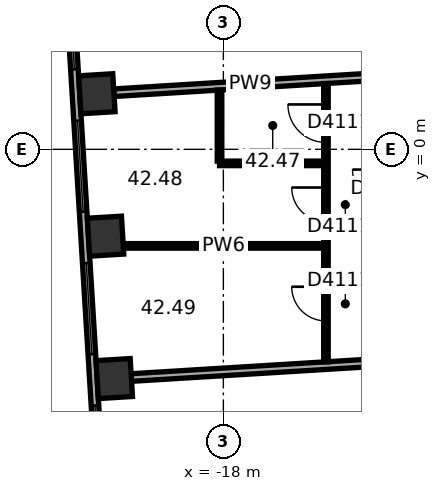
"""IFC4 building model, lengths in metres.
Left out: names, types, materials, properties, quantities, classifications, styles, units other than length and angle.
Written with IfcOpenShell. Run it as: python <this file> out.ifc"""

import sys

from ifc_helpers import new_model, si_unit, direction, frame, frame_2d, origin, origin_2d, place, context, subcontext, project, spatial, rectangle, extrude, element, fill, save


model = new_model("IFC4")
c1 = context("Model", 3, precision=1e-05, world=origin(), true_north=direction((0.0, 1.0)))
c2 = subcontext(c1, "Body", "Model", "MODEL_VIEW")
j1 = project(units=[si_unit("LENGTHUNIT", "METRE"), si_unit("PLANEANGLEUNIT", "RADIAN")], contexts=[c1])
p1 = place(None, origin())
s1 = spatial("IfcSite", under=j1, at=p1, CompositionType="ELEMENT")
p2 = place(p1, origin())
s2 = spatial("IfcBuilding", under=s1, at=p2, CompositionType="ELEMENT")
p3 = place(p2, frame((0.0, 0.0, 172.5)))
s3 = spatial("IfcBuildingStorey", under=s2, at=p3, CompositionType="ELEMENT", Elevation=172.5)
for number, where, z_axis, x_axis in (
    (1, (-21.329, 1.462, 0.0), (0.0, 0.0, 1.0), (0.061, -0.998, 0.0)),
    (2, (-21.1, -2.285, 0.0), (0.0, 0.0, 1.0), (0.061, -0.998, 0.0)),
    (3, (-20.871, -6.032, 0.0), (0.0, 0.0, 1.0), (0.061, -0.998, 0.0)),
):
    element("IfcColumn", number, at=place(p3, frame(where, z_axis=z_axis, x_axis=x_axis)), inside=s3, PredefinedType="COLUMN", context=c2, shape_type="SweptSolid", body=[
        extrude(rectangle(XDim=1.0, YDim=0.9, at=origin_2d()), origin(), (0.0, 0.0, 1.0), 3.7),
    ])
p4 = place(p3, frame((-22.375, 9.557, 0.0), z_axis=(0.0, 0.0, 1.0), x_axis=(0.061036015339, -0.998135564356, 0.0)))
e4 = element("IfcWall", 4, at=p4, inside=s3, PredefinedType="STANDARD", context=c2, shape_type="SweptSolid", body=[
    extrude(rectangle(XDim=20.044, YDim=0.2, at=frame_2d((10.022, 0.0))), origin(), (0.0, 0.0, 1.0), 3.7),
])
p5 = place(p4, frame((1.313, 0.0, 0.9)))
e5 = element("IfcOpeningElement", 5, at=p5, cuts=e4, PredefinedType="OPENING", context=c2, shape_type="SweptSolid", body=[
    extrude(rectangle(XDim=2.4, YDim=2.0, at=frame_2d((1.2, 1.0))), frame((0.0, 0.11, 0.0), z_axis=(0.0, -1.0, 0.0), x_axis=(1.0, 0.0, 0.0)), (0.0, 0.0, 1.0), 0.22),
])
p6 = place(p4, frame((5.067, 0.0, 0.9)))
e6 = element("IfcOpeningElement", 6, at=p6, cuts=e4, PredefinedType="OPENING", context=c2, shape_type="SweptSolid", body=[
    extrude(rectangle(XDim=2.4, YDim=2.0, at=frame_2d((1.2, 1.0))), frame((0.0, 0.11, 0.0), z_axis=(0.0, -1.0, 0.0), x_axis=(1.0, 0.0, 0.0)), (0.0, 0.0, 1.0), 0.22),
])
p7 = place(p4, frame((8.821, 0.0, 0.9)))
e7 = element("IfcOpeningElement", 7, at=p7, cuts=e4, PredefinedType="OPENING", context=c2, shape_type="SweptSolid", body=[
    extrude(rectangle(XDim=2.4, YDim=2.0, at=frame_2d((1.2, 1.0))), frame((0.0, 0.11, 0.0), z_axis=(0.0, -1.0, 0.0), x_axis=(1.0, 0.0, 0.0)), (0.0, 0.0, 1.0), 0.22),
])
p8 = place(p4, frame((12.575, 0.0, 0.9)))
e8 = element("IfcOpeningElement", 8, at=p8, cuts=e4, PredefinedType="OPENING", context=c2, shape_type="SweptSolid", body=[
    extrude(rectangle(XDim=2.4, YDim=2.0, at=frame_2d((1.2, 1.0))), frame((0.0, 0.11, 0.0), z_axis=(0.0, -1.0, 0.0), x_axis=(1.0, 0.0, 0.0)), (0.0, 0.0, 1.0), 0.22),
])
p9 = place(p4, frame((16.329, 0.0, 0.9)))
e9 = element("IfcOpeningElement", 9, at=p9, cuts=e4, PredefinedType="OPENING", context=c2, shape_type="SweptSolid", body=[
    extrude(rectangle(XDim=2.4, YDim=2.0, at=frame_2d((1.2, 1.0))), frame((0.0, 0.11, 0.0), z_axis=(0.0, -1.0, 0.0), x_axis=(1.0, 0.0, 0.0)), (0.0, 0.0, 1.0), 0.22),
])
p10 = place(p3, frame((-20.88, 1.49, 0.0), z_axis=(0.0, 0.0, 1.0), x_axis=(0.998134881975, 0.061047173439, 0.0)))
e10 = element("IfcWall", 10, at=p10, inside=s3, PredefinedType="PARTITIONING", context=c2, shape_type="SweptSolid", body=[
    extrude(rectangle(XDim=7.183, YDim=0.2, at=frame_2d((3.591, 0.0))), origin(), (0.0, 0.0, 1.0), 2.87),
])
p11 = place(p3, frame((-20.633, -2.541, 0.0), z_axis=(0.0, 0.0, 1.0), x_axis=(1.0, 0.0, 0.0)))
e11 = element("IfcWall", 11, at=p11, inside=s3, PredefinedType="PARTITIONING", context=c2, shape_type="SweptSolid", body=[
    extrude(rectangle(XDim=5.272, YDim=0.12, at=frame_2d((2.636, 0.0))), origin(), (0.0, 0.0, 1.0), 3.42),
])
p12 = place(p3, frame((-20.421, -6.005, 0.0), z_axis=(0.0, 0.0, 1.0), x_axis=(0.998134865741, 0.061047438866, 0.0)))
e12 = element("IfcWall", 12, at=p12, inside=s3, PredefinedType="PARTITIONING", context=c2, shape_type="SweptSolid", body=[
    extrude(rectangle(XDim=7.927, YDim=0.2, at=frame_2d((3.963, 0.0))), origin(), (0.0, 0.0, 1.0), 2.87),
])
p13 = place(p3, frame((-18.101, -0.369, 0.0), z_axis=(0.0, 0.0, 1.0), x_axis=(1.0, 0.0, 0.0)))
e13 = element("IfcWall", 13, at=p13, inside=s3, PredefinedType="PARTITIONING", context=c2, shape_type="SweptSolid", body=[
    extrude(rectangle(XDim=2.74, YDim=0.12, at=frame_2d((1.37, 0.0))), origin(), (0.0, 0.0, 1.0), 3.42),
])
p14 = place(p3, frame((-18.101, 1.559, 0.0), z_axis=(0.0, 0.0, 1.0), x_axis=(0.0, -1.0, 0.0)))
e14 = element("IfcWall", 14, at=p14, inside=s3, PredefinedType="PARTITIONING", context=c2, shape_type="SweptSolid", body=[
    extrude(rectangle(XDim=1.869, YDim=0.12, at=frame_2d((0.934, 0.0))), origin(), (0.0, 0.0, 1.0), 3.42),
])
p15 = place(p3, frame((-15.301, 1.731, 0.0), z_axis=(0.0, 0.0, 1.0), x_axis=(0.0, -1.0, 0.0)))
e15 = element("IfcWall", 15, at=p15, inside=s3, PredefinedType="PARTITIONING", context=c2, shape_type="SweptSolid", body=[
    extrude(rectangle(XDim=7.322, YDim=0.12, at=frame_2d((3.661, 0.0))), origin(), (0.0, 0.0, 1.0), 3.42),
])
p16 = place(p15, frame((0.55, 0.0, 0.0)))
e16 = element("IfcOpeningElement", 16, at=p16, cuts=e15, PredefinedType="OPENING", context=c2, shape_type="SweptSolid", body=[
    extrude(rectangle(XDim=1.0, YDim=2.1, at=frame_2d((0.5, 1.05))), frame((0.0, 0.07, 0.0), z_axis=(0.0, -1.0, 0.0), x_axis=(1.0, 0.0, 0.0)), (0.0, 0.0, 1.0), 0.14),
])
p17 = place(p15, frame((2.736, 0.0, 0.0)))
e17 = element("IfcOpeningElement", 17, at=p17, cuts=e15, PredefinedType="OPENING", context=c2, shape_type="SweptSolid", body=[
    extrude(rectangle(XDim=0.9, YDim=2.1, at=frame_2d((0.45, 1.05))), frame((0.0, 0.07, 0.0), z_axis=(0.0, -1.0, 0.0), x_axis=(1.0, 0.0, 0.0)), (0.0, 0.0, 1.0), 0.14),
])
p18 = place(p15, frame((5.347, 0.0, 0.0)))
e18 = element("IfcOpeningElement", 18, at=p18, cuts=e15, PredefinedType="OPENING", context=c2, shape_type="SweptSolid", body=[
    extrude(rectangle(XDim=0.9, YDim=2.1, at=frame_2d((0.45, 1.05))), frame((0.0, 0.07, 0.0), z_axis=(0.0, -1.0, 0.0), x_axis=(1.0, 0.0, 0.0)), (0.0, 0.0, 1.0), 0.14),
])
p19 = place(p6, origin())
e19 = element("IfcWindow", 19, at=p19, inside=s3, PartitioningType="SINGLE_PANEL", PredefinedType="WINDOW", context=c2, shape_type="SweptSolid", body=[
    extrude(rectangle(XDim=2.4, YDim=2.0, at=frame_2d((1.2, 1.0))), frame((0.0, 0.03, 0.0), z_axis=(0.0, -1.0, 0.0), x_axis=(1.0, 0.0, 0.0)), (0.0, 0.0, 1.0), 0.06),
])
fill(e6, e19)
p20 = place(p7, origin())
e20 = element("IfcWindow", 20, at=p20, inside=s3, PartitioningType="SINGLE_PANEL", PredefinedType="WINDOW", context=c2, shape_type="SweptSolid", body=[
    extrude(rectangle(XDim=2.4, YDim=2.0, at=frame_2d((1.2, 1.0))), frame((0.0, 0.03, 0.0), z_axis=(0.0, -1.0, 0.0), x_axis=(1.0, 0.0, 0.0)), (0.0, 0.0, 1.0), 0.06),
])
fill(e7, e20)
p21 = place(p8, origin())
e21 = element("IfcWindow", 21, at=p21, inside=s3, PartitioningType="SINGLE_PANEL", PredefinedType="WINDOW", context=c2, shape_type="SweptSolid", body=[
    extrude(rectangle(XDim=2.4, YDim=2.0, at=frame_2d((1.2, 1.0))), frame((0.0, 0.03, 0.0), z_axis=(0.0, -1.0, 0.0), x_axis=(1.0, 0.0, 0.0)), (0.0, 0.0, 1.0), 0.06),
])
fill(e8, e21)
p22 = place(p9, origin())
e22 = element("IfcWindow", 22, at=p22, inside=s3, PartitioningType="SINGLE_PANEL", PredefinedType="WINDOW", context=c2, shape_type="SweptSolid", body=[
    extrude(rectangle(XDim=2.4, YDim=2.0, at=frame_2d((1.2, 1.0))), frame((0.0, 0.03, 0.0), z_axis=(0.0, -1.0, 0.0), x_axis=(1.0, 0.0, 0.0)), (0.0, 0.0, 1.0), 0.06),
])
fill(e9, e22)
p23 = place(p16, origin())
e23 = element("IfcDoor", 23, at=p23, inside=s3, OperationType="SINGLE_SWING_LEFT", PredefinedType="DOOR", context=c2, shape_type="SweptSolid", body=[
    extrude(rectangle(XDim=1.0, YDim=2.1, at=frame_2d((0.5, 1.05))), frame((0.0, 0.025, 0.0), z_axis=(0.0, -1.0, 0.0), x_axis=(1.0, 0.0, 0.0)), (0.0, 0.0, 1.0), 0.05),
])
fill(e16, e23)
p24 = place(p17, origin())
e24 = element("IfcDoor", 24, at=p24, inside=s3, OperationType="SINGLE_SWING_LEFT", PredefinedType="DOOR", context=c2, shape_type="SweptSolid", body=[
    extrude(rectangle(XDim=0.9, YDim=2.1, at=frame_2d((0.45, 1.05))), frame((0.0, 0.025, 0.0), z_axis=(0.0, -1.0, 0.0), x_axis=(1.0, 0.0, 0.0)), (0.0, 0.0, 1.0), 0.05),
])
fill(e17, e24)
p25 = place(p18, origin())
e25 = element("IfcDoor", 25, at=p25, inside=s3, OperationType="SINGLE_SWING_LEFT", PredefinedType="DOOR", context=c2, shape_type="SweptSolid", body=[
    extrude(rectangle(XDim=0.9, YDim=2.1, at=frame_2d((0.45, 1.05))), frame((0.0, 0.025, 0.0), z_axis=(0.0, -1.0, 0.0), x_axis=(1.0, 0.0, 0.0)), (0.0, 0.0, 1.0), 0.05),
])
fill(e18, e25)
save(model, sys.argv[1])
